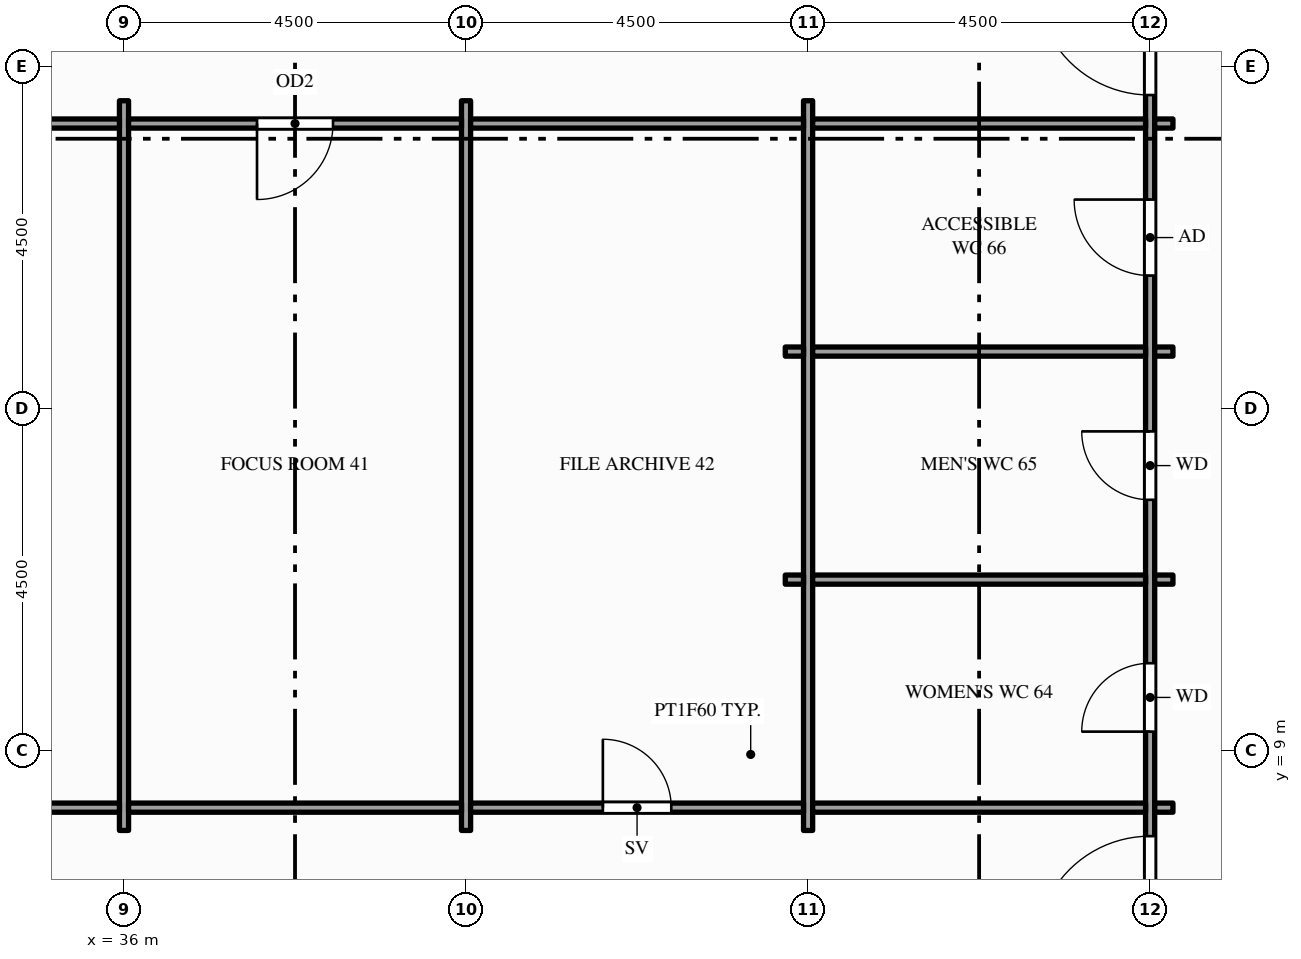
"""IFC4 building model, lengths in metres.
Left out: names, types, materials, properties, quantities, classifications, styles, units other than length and angle.
Written with IfcOpenShell. Run it as: python <this file> out.ifc"""

import sys

from ifc_helpers import new_model, si_unit, direction, frame, frame_2d, origin, place, context, subcontext, project, spatial, rectangle, extrude, element, fill, save


model = new_model("IFC4")
c1 = context("Model", 3, precision=1e-05, world=origin(), true_north=direction((0.0, 1.0)))
c2 = subcontext(c1, "Body", "Model", "MODEL_VIEW")
j1 = project(units=[si_unit("LENGTHUNIT", "METRE"), si_unit("PLANEANGLEUNIT", "RADIAN")], contexts=[c1])
p1 = place(None, origin())
s1 = spatial("IfcSite", under=j1, at=p1, CompositionType="ELEMENT")
p2 = place(p1, origin())
s2 = spatial("IfcBuilding", under=s1, at=p2, CompositionType="ELEMENT")
p3 = place(p2, frame((0.0, 0.0, 183.0)))
s3 = spatial("IfcBuildingStorey", under=s2, at=p3, CompositionType="ELEMENT", Elevation=183.0)
for number, where, z_axis, x_axis in (
    (1, (36.0, 7.95, 0.0), (0.0, 0.0, 1.0), (0.0, 1.0, 0.0)),
    (2, (40.5, 7.95, 0.0), (0.0, 0.0, 1.0), (0.0, 1.0, 0.0)),
    (3, (45.0, 7.95, 0.0), (0.0, 0.0, 1.0), (0.0, 1.0, 0.0)),
):
    element("IfcWall", number, at=place(p3, frame(where, z_axis=z_axis, x_axis=x_axis)), inside=s3, PredefinedType="PARTITIONING", context=c2, shape_type="SweptSolid", body=[
        extrude(rectangle(XDim=9.6, YDim=0.12, at=frame_2d((4.8, 0.0))), origin(), (0.0, 0.0, 1.0), 2.77),
    ])
p4 = place(p3, frame((49.5, 1.65, 0.0), z_axis=(0.0, 0.0, 1.0), x_axis=(0.0, 1.0, 0.0)))
e4 = element("IfcWall", 4, at=p4, inside=s3, PredefinedType="PARTITIONING", context=c2, shape_type="SweptSolid", body=[
    extrude(rectangle(XDim=22.2, YDim=0.12, at=frame_2d((11.1, 0.0))), origin(), (0.0, 0.0, 1.0), 2.35),
])
p5 = place(p4, frame((4.725, 0.0, 0.0)))
e5 = element("IfcOpeningElement", 5, at=p5, cuts=e4, PredefinedType="OPENING", context=c2, shape_type="SweptSolid", body=[
    extrude(rectangle(XDim=1.5, YDim=2.1, at=frame_2d((0.75, 1.05))), frame((0.0, 0.07, 0.0), z_axis=(0.0, -1.0, 0.0), x_axis=(1.0, 0.0, 0.0)), (0.0, 0.0, 1.0), 0.14),
])
p6 = place(p4, frame((15.975, 0.0, 0.0)))
e6 = element("IfcOpeningElement", 6, at=p6, cuts=e4, PredefinedType="OPENING", context=c2, shape_type="SweptSolid", body=[
    extrude(rectangle(XDim=1.5, YDim=2.1, at=frame_2d((0.75, 1.05))), frame((0.0, 0.07, 0.0), z_axis=(0.0, -1.0, 0.0), x_axis=(1.0, 0.0, 0.0)), (0.0, 0.0, 1.0), 0.14),
])
p7 = place(p4, frame((7.6, 0.0, 0.0)))
e7 = element("IfcOpeningElement", 7, at=p7, cuts=e4, PredefinedType="OPENING", context=c2, shape_type="SweptSolid", body=[
    extrude(rectangle(XDim=0.9, YDim=2.1, at=frame_2d((0.45, 1.05))), frame((0.0, 0.07, 0.0), z_axis=(0.0, -1.0, 0.0), x_axis=(1.0, 0.0, 0.0)), (0.0, 0.0, 1.0), 0.14),
])
p8 = place(p4, frame((10.65, 0.0, 0.0)))
e8 = element("IfcOpeningElement", 8, at=p8, cuts=e4, PredefinedType="OPENING", context=c2, shape_type="SweptSolid", body=[
    extrude(rectangle(XDim=0.9, YDim=2.1, at=frame_2d((0.45, 1.05))), frame((0.0, 0.07, 0.0), z_axis=(0.0, -1.0, 0.0), x_axis=(1.0, 0.0, 0.0)), (0.0, 0.0, 1.0), 0.14),
])
p9 = place(p4, frame((13.6, 0.0, 0.0)))
e9 = element("IfcOpeningElement", 9, at=p9, cuts=e4, PredefinedType="OPENING", context=c2, shape_type="SweptSolid", body=[
    extrude(rectangle(XDim=1.0, YDim=2.1, at=frame_2d((0.5, 1.05))), frame((0.0, 0.07, 0.0), z_axis=(0.0, -1.0, 0.0), x_axis=(1.0, 0.0, 0.0)), (0.0, 0.0, 1.0), 0.14),
])
p10 = place(p3, frame((29.31, 8.25, 0.0), z_axis=(0.0, 0.0, 1.0), x_axis=(1.0, 0.0, 0.0)))
e10 = element("IfcWall", 10, at=p10, inside=s3, PredefinedType="PARTITIONING", context=c2, shape_type="SweptSolid", body=[
    extrude(rectangle(XDim=6.63, YDim=0.12, at=frame_2d((3.315, 0.0))), origin(), (0.0, 0.0, 1.0), 2.77),
])
p11 = place(p10, frame((2.815, 0.0, 0.0)))
e11 = element("IfcOpeningElement", 11, at=p11, cuts=e10, PredefinedType="OPENING", context=c2, shape_type="SweptSolid", body=[
    extrude(rectangle(XDim=1.0, YDim=2.1, at=frame_2d((0.5, 1.05))), frame((0.0, 0.07, 0.0), z_axis=(0.0, -1.0, 0.0), x_axis=(1.0, 0.0, 0.0)), (0.0, 0.0, 1.0), 0.14),
])
p12 = place(p3, frame((36.06, 8.25, 0.0), z_axis=(0.0, 0.0, 1.0), x_axis=(1.0, 0.0, 0.0)))
e12 = element("IfcWall", 12, at=p12, inside=s3, PredefinedType="PARTITIONING", context=c2, shape_type="SweptSolid", body=[
    extrude(rectangle(XDim=4.38, YDim=0.12, at=frame_2d((2.19, 0.0))), origin(), (0.0, 0.0, 1.0), 2.77),
])
p13 = place(p3, frame((40.56, 8.25, 0.0), z_axis=(0.0, 0.0, 1.0), x_axis=(1.0, 0.0, 0.0)))
e13 = element("IfcWall", 13, at=p13, inside=s3, PredefinedType="PARTITIONING", context=c2, shape_type="SweptSolid", body=[
    extrude(rectangle(XDim=4.38, YDim=0.12, at=frame_2d((2.19, 0.0))), origin(), (0.0, 0.0, 1.0), 2.77),
])
p14 = place(p13, frame((1.74, 0.0, 0.0)))
e14 = element("IfcOpeningElement", 14, at=p14, cuts=e13, PredefinedType="OPENING", context=c2, shape_type="SweptSolid", body=[
    extrude(rectangle(XDim=0.9, YDim=2.1, at=frame_2d((0.45, 1.05))), frame((0.0, 0.07, 0.0), z_axis=(0.0, -1.0, 0.0), x_axis=(1.0, 0.0, 0.0)), (0.0, 0.0, 1.0), 0.14),
])
p15 = place(p3, frame((45.06, 8.25, 0.0), z_axis=(0.0, 0.0, 1.0), x_axis=(1.0, 0.0, 0.0)))
e15 = element("IfcWall", 15, at=p15, inside=s3, PredefinedType="PARTITIONING", context=c2, shape_type="SweptSolid", body=[
    extrude(rectangle(XDim=4.38, YDim=0.12, at=frame_2d((2.19, 0.0))), origin(), (0.0, 0.0, 1.0), 2.77),
])
for number, where, z_axis, x_axis in (
    (16, (49.56, 8.25, 0.0), (0.0, 0.0, 1.0), (1.0, 0.0, 0.0)),
    (17, (44.7, 11.25, 0.0), (0.0, 0.0, 1.0), (1.0, 0.0, 0.0)),
):
    element("IfcWall", number, at=place(p3, frame(where, z_axis=z_axis, x_axis=x_axis)), inside=s3, PredefinedType="PARTITIONING", context=c2, shape_type="SweptSolid", body=[
        extrude(rectangle(XDim=0.24, YDim=0.12, at=frame_2d((0.12, 0.0))), origin(), (0.0, 0.0, 1.0), 2.77),
    ])
p16 = place(p3, frame((45.06, 11.25, 0.0), z_axis=(0.0, 0.0, 1.0), x_axis=(1.0, 0.0, 0.0)))
e18 = element("IfcWall", 18, at=p16, inside=s3, PredefinedType="PARTITIONING", context=c2, shape_type="SweptSolid", body=[
    extrude(rectangle(XDim=4.38, YDim=0.12, at=frame_2d((2.19, 0.0))), origin(), (0.0, 0.0, 1.0), 2.77),
])
for number, where, z_axis, x_axis in (
    (19, (49.56, 11.25, 0.0), (0.0, 0.0, 1.0), (1.0, 0.0, 0.0)),
    (20, (44.7, 14.25, 0.0), (0.0, 0.0, 1.0), (1.0, 0.0, 0.0)),
):
    element("IfcWall", number, at=place(p3, frame(where, z_axis=z_axis, x_axis=x_axis)), inside=s3, PredefinedType="PARTITIONING", context=c2, shape_type="SweptSolid", body=[
        extrude(rectangle(XDim=0.24, YDim=0.12, at=frame_2d((0.12, 0.0))), origin(), (0.0, 0.0, 1.0), 2.77),
    ])
p17 = place(p3, frame((45.06, 14.25, 0.0), z_axis=(0.0, 0.0, 1.0), x_axis=(1.0, 0.0, 0.0)))
e21 = element("IfcWall", 21, at=p17, inside=s3, PredefinedType="PARTITIONING", context=c2, shape_type="SweptSolid", body=[
    extrude(rectangle(XDim=4.38, YDim=0.12, at=frame_2d((2.19, 0.0))), origin(), (0.0, 0.0, 1.0), 2.77),
])
p18 = place(p3, frame((49.56, 14.25, 0.0), z_axis=(0.0, 0.0, 1.0), x_axis=(1.0, 0.0, 0.0)))
e22 = element("IfcWall", 22, at=p18, inside=s3, PredefinedType="PARTITIONING", context=c2, shape_type="SweptSolid", body=[
    extrude(rectangle(XDim=0.24, YDim=0.12, at=frame_2d((0.12, 0.0))), origin(), (0.0, 0.0, 1.0), 2.77),
])
p19 = place(p3, frame((29.31, 17.25, 0.0), z_axis=(0.0, 0.0, 1.0), x_axis=(1.0, 0.0, 0.0)))
e23 = element("IfcWall", 23, at=p19, inside=s3, PredefinedType="PARTITIONING", context=c2, shape_type="SweptSolid", body=[
    extrude(rectangle(XDim=6.63, YDim=0.12, at=frame_2d((3.315, 0.0))), origin(), (0.0, 0.0, 1.0), 2.77),
])
p20 = place(p3, frame((36.06, 17.25, 0.0), z_axis=(0.0, 0.0, 1.0), x_axis=(1.0, 0.0, 0.0)))
e24 = element("IfcWall", 24, at=p20, inside=s3, PredefinedType="PARTITIONING", context=c2, shape_type="SweptSolid", body=[
    extrude(rectangle(XDim=4.38, YDim=0.12, at=frame_2d((2.19, 0.0))), origin(), (0.0, 0.0, 1.0), 2.77),
])
p21 = place(p20, frame((1.69, 0.0, 0.0)))
e25 = element("IfcOpeningElement", 25, at=p21, cuts=e24, PredefinedType="OPENING", context=c2, shape_type="SweptSolid", body=[
    extrude(rectangle(XDim=1.0, YDim=2.1, at=frame_2d((0.5, 1.05))), frame((0.0, 0.07, 0.0), z_axis=(0.0, -1.0, 0.0), x_axis=(1.0, 0.0, 0.0)), (0.0, 0.0, 1.0), 0.14),
])
for number, where, z_axis, x_axis in (
    (26, (40.56, 17.25, 0.0), (0.0, 0.0, 1.0), (1.0, 0.0, 0.0)),
    (27, (45.06, 17.25, 0.0), (0.0, 0.0, 1.0), (1.0, 0.0, 0.0)),
):
    element("IfcWall", number, at=place(p3, frame(where, z_axis=z_axis, x_axis=x_axis)), inside=s3, PredefinedType="PARTITIONING", context=c2, shape_type="SweptSolid", body=[
        extrude(rectangle(XDim=4.38, YDim=0.12, at=frame_2d((2.19, 0.0))), origin(), (0.0, 0.0, 1.0), 2.77),
    ])
p22 = place(p3, frame((49.56, 17.25, 0.0), z_axis=(0.0, 0.0, 1.0), x_axis=(1.0, 0.0, 0.0)))
e28 = element("IfcWall", 28, at=p22, inside=s3, PredefinedType="PARTITIONING", context=c2, shape_type="SweptSolid", body=[
    extrude(rectangle(XDim=0.24, YDim=0.12, at=frame_2d((0.12, 0.0))), origin(), (0.0, 0.0, 1.0), 2.77),
])
p23 = place(p5, origin())
e29 = element("IfcDoor", 29, at=p23, inside=s3, OperationType="SINGLE_SWING_LEFT", PredefinedType="DOOR", context=c2, shape_type="SweptSolid", body=[
    extrude(rectangle(XDim=1.5, YDim=2.1, at=frame_2d((0.75, 1.05))), frame((0.0, 0.025, 0.0), z_axis=(0.0, -1.0, 0.0), x_axis=(1.0, 0.0, 0.0)), (0.0, 0.0, 1.0), 0.05),
])
fill(e5, e29)
p24 = place(p6, origin())
e30 = element("IfcDoor", 30, at=p24, inside=s3, OperationType="SINGLE_SWING_RIGHT", PredefinedType="DOOR", context=c2, shape_type="SweptSolid", body=[
    extrude(rectangle(XDim=1.5, YDim=2.1, at=frame_2d((0.75, 1.05))), frame((0.0, 0.025, 0.0), z_axis=(0.0, -1.0, 0.0), x_axis=(1.0, 0.0, 0.0)), (0.0, 0.0, 1.0), 0.05),
])
fill(e6, e30)
p25 = place(p21, origin())
e31 = element("IfcDoor", 31, at=p25, inside=s3, OperationType="SINGLE_SWING_LEFT", PredefinedType="DOOR", context=c2, shape_type="SweptSolid", body=[
    extrude(rectangle(XDim=1.0, YDim=2.1, at=frame_2d((0.5, 1.05))), frame((0.0, 0.025, 0.0), z_axis=(0.0, -1.0, 0.0), x_axis=(1.0, 0.0, 0.0)), (0.0, 0.0, 1.0), 0.05),
])
fill(e25, e31)
p26 = place(p14, origin())
e32 = element("IfcDoor", 32, at=p26, inside=s3, OperationType="SINGLE_SWING_LEFT", PredefinedType="DOOR", context=c2, shape_type="SweptSolid", body=[
    extrude(rectangle(XDim=0.9, YDim=2.1, at=frame_2d((0.45, 1.05))), frame((0.0, 0.025, 0.0), z_axis=(0.0, -1.0, 0.0), x_axis=(1.0, 0.0, 0.0)), (0.0, 0.0, 1.0), 0.05),
])
fill(e14, e32)
p27 = place(p7, origin())
e33 = element("IfcDoor", 33, at=p27, inside=s3, OperationType="SINGLE_SWING_LEFT", PredefinedType="DOOR", context=c2, shape_type="SweptSolid", body=[
    extrude(rectangle(XDim=0.9, YDim=2.1, at=frame_2d((0.45, 1.05))), frame((0.0, 0.025, 0.0), z_axis=(0.0, -1.0, 0.0), x_axis=(1.0, 0.0, 0.0)), (0.0, 0.0, 1.0), 0.05),
])
fill(e7, e33)
p28 = place(p8, origin())
e34 = element("IfcDoor", 34, at=p28, inside=s3, OperationType="SINGLE_SWING_RIGHT", PredefinedType="DOOR", context=c2, shape_type="SweptSolid", body=[
    extrude(rectangle(XDim=0.9, YDim=2.1, at=frame_2d((0.45, 1.05))), frame((0.0, 0.025, 0.0), z_axis=(0.0, -1.0, 0.0), x_axis=(1.0, 0.0, 0.0)), (0.0, 0.0, 1.0), 0.05),
])
fill(e8, e34)
p29 = place(p9, origin())
e35 = element("IfcDoor", 35, at=p29, inside=s3, OperationType="SINGLE_SWING_RIGHT", PredefinedType="DOOR", context=c2, shape_type="SweptSolid", body=[
    extrude(rectangle(XDim=1.0, YDim=2.1, at=frame_2d((0.5, 1.05))), frame((0.0, 0.025, 0.0), z_axis=(0.0, -1.0, 0.0), x_axis=(1.0, 0.0, 0.0)), (0.0, 0.0, 1.0), 0.05),
])
fill(e9, e35)
save(model, sys.argv[1])
